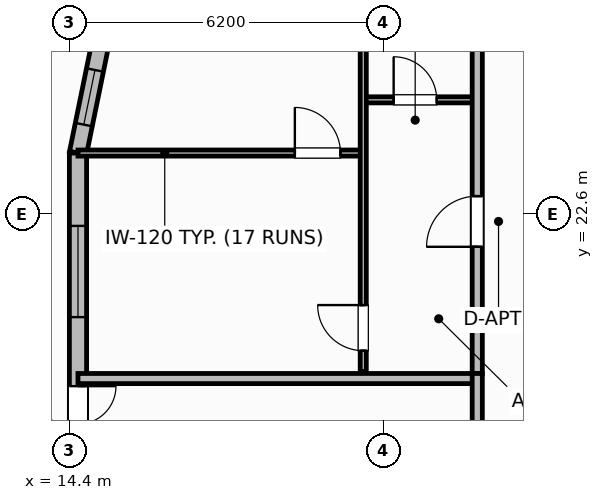
"""IFC4 building model, lengths in metres.
Left out: names, types, materials, properties, quantities, classifications, styles, units other than length and angle.
Written with IfcOpenShell. Run it as: python <this file> out.ifc"""

import sys

from ifc_helpers import new_model, si_unit, direction, frame, frame_2d, origin, place, context, subcontext, project, spatial, rectangle, extrude, element, fill, save


model = new_model("IFC4")
c1 = context("Model", 3, precision=1e-05, world=origin(), true_north=direction((0.0, 1.0)))
c2 = subcontext(c1, "Body", "Model", "MODEL_VIEW")
j1 = project(units=[si_unit("LENGTHUNIT", "METRE"), si_unit("PLANEANGLEUNIT", "RADIAN")], contexts=[c1])
p1 = place(None, origin())
s1 = spatial("IfcSite", under=j1, at=p1, CompositionType="ELEMENT")
p2 = place(p1, origin())
s2 = spatial("IfcBuilding", under=s1, at=p2, CompositionType="ELEMENT")
p3 = place(p2, frame((0.0, 0.0, 24.6)))
s3 = spatial("IfcBuildingStorey", under=s2, at=p3, CompositionType="ELEMENT", Elevation=24.6)
p4 = place(p3, frame((15.02, 26.0, 0.0), z_axis=(0.0, 0.0, 1.0), x_axis=(-0.200379633636, -0.979718328104, 0.0)))
e1 = element("IfcWall", 1, at=p4, inside=s3, PredefinedType="SOLIDWALL", context=c2, shape_type="SweptSolid", body=[
    extrude(rectangle(XDim=2.246, YDim=0.34, at=frame_2d((1.123, 0.0))), origin(), (0.0, 0.0, 1.0), 3.2),
])
p5 = place(p4, frame((0.573, 0.0, 0.95)))
e2 = element("IfcOpeningElement", 2, at=p5, cuts=e1, PredefinedType="OPENING", context=c2, shape_type="SweptSolid", body=[
    extrude(rectangle(XDim=1.1, YDim=1.65, at=frame_2d((0.55, 0.825))), frame((0.0, 0.18, 0.0), z_axis=(0.0, -1.0, 0.0), x_axis=(1.0, 0.0, 0.0)), (0.0, 0.0, 1.0), 0.36),
])
p6 = place(p3, frame((14.57, 23.8, 0.0), z_axis=(0.0, 0.0, 1.0), x_axis=(0.0, -1.0, 0.0)))
e3 = element("IfcWall", 3, at=p6, inside=s3, PredefinedType="SOLIDWALL", context=c2, shape_type="SweptSolid", body=[
    extrude(rectangle(XDim=14.8, YDim=0.34, at=frame_2d((7.4, 0.0))), origin(), (0.0, 0.0, 1.0), 3.2),
])
p7 = place(p6, frame((1.438, 0.0, 0.85)))
e4 = element("IfcOpeningElement", 4, at=p7, cuts=e3, PredefinedType="OPENING", context=c2, shape_type="SweptSolid", body=[
    extrude(rectangle(XDim=1.8, YDim=1.85, at=frame_2d((0.9, 0.925))), frame((0.0, 0.18, 0.0), z_axis=(0.0, -1.0, 0.0), x_axis=(1.0, 0.0, 0.0)), (0.0, 0.0, 1.0), 0.36),
])
p8 = place(p6, frame((4.6, 0.0, 0.0)))
e5 = element("IfcOpeningElement", 5, at=p8, cuts=e3, PredefinedType="OPENING", context=c2, shape_type="SweptSolid", body=[
    extrude(rectangle(XDim=1.5, YDim=2.1, at=frame_2d((0.75, 1.05))), frame((0.0, 0.18, 0.0), z_axis=(0.0, -1.0, 0.0), x_axis=(1.0, 0.0, 0.0)), (0.0, 0.0, 1.0), 0.36),
])
p9 = place(p6, frame((8.538, 0.0, 0.85)))
e6 = element("IfcOpeningElement", 6, at=p9, cuts=e3, PredefinedType="OPENING", context=c2, shape_type="SweptSolid", body=[
    extrude(rectangle(XDim=1.8, YDim=1.85, at=frame_2d((0.9, 0.925))), frame((0.0, 0.18, 0.0), z_axis=(0.0, -1.0, 0.0), x_axis=(1.0, 0.0, 0.0)), (0.0, 0.0, 1.0), 0.36),
])
p10 = place(p3, frame((14.57, 19.35, 0.0), z_axis=(0.0, 0.0, 1.0), x_axis=(1.0, 0.0, 0.0)))
e7 = element("IfcWall", 7, at=p10, inside=s3, PredefinedType="PARTITIONING", context=c2, shape_type="SweptSolid", body=[
    extrude(rectangle(XDim=7.88, YDim=0.2, at=frame_2d((3.94, 0.0))), origin(), (0.0, 0.0, 1.0), 3.03),
])
p11 = place(p3, frame((20.2, 24.85, 0.0), z_axis=(0.0, 0.0, 1.0), x_axis=(1.0, 0.0, 0.0)))
e8 = element("IfcWall", 8, at=p11, inside=s3, PredefinedType="PARTITIONING", context=c2, shape_type="SweptSolid", body=[
    extrude(rectangle(XDim=2.25, YDim=0.12, at=frame_2d((1.125, 0.0))), origin(), (0.0, 0.0, 1.0), 3.03),
])
p12 = place(p11, frame((0.6, 0.0, 0.0)))
e9 = element("IfcOpeningElement", 9, at=p12, cuts=e8, PredefinedType="OPENING", context=c2, shape_type="SweptSolid", body=[
    extrude(rectangle(XDim=0.85, YDim=2.1, at=frame_2d((0.425, 1.05))), frame((0.0, 0.07, 0.0), z_axis=(0.0, -1.0, 0.0), x_axis=(1.0, 0.0, 0.0)), (0.0, 0.0, 1.0), 0.14),
])
p13 = place(p3, frame((14.57, 23.8, 0.0), z_axis=(0.0, 0.0, 1.0), x_axis=(1.0, 0.0, 0.0)))
e10 = element("IfcWall", 10, at=p13, inside=s3, PredefinedType="PARTITIONING", context=c2, shape_type="SweptSolid", body=[
    extrude(rectangle(XDim=5.63, YDim=0.12, at=frame_2d((2.815, 0.0))), origin(), (0.0, 0.0, 1.0), 3.03),
])
p14 = place(p13, frame((4.28, 0.0, 0.0)))
e11 = element("IfcOpeningElement", 11, at=p14, cuts=e10, PredefinedType="OPENING", context=c2, shape_type="SweptSolid", body=[
    extrude(rectangle(XDim=0.9, YDim=2.1, at=frame_2d((0.45, 1.05))), frame((0.0, 0.07, 0.0), z_axis=(0.0, -1.0, 0.0), x_axis=(1.0, 0.0, 0.0)), (0.0, 0.0, 1.0), 0.14),
])
p15 = place(p3, frame((20.2, 19.49, 0.0), z_axis=(0.0, 0.0, 1.0), x_axis=(0.0, 1.0, 0.0)))
e12 = element("IfcWall", 12, at=p15, inside=s3, PredefinedType="PARTITIONING", context=c2, shape_type="SweptSolid", body=[
    extrude(rectangle(XDim=13.095, YDim=0.12, at=frame_2d((6.547, 0.0))), origin(), (0.0, 0.0, 1.0), 3.03),
])
p16 = place(p15, frame((0.41, 0.0, 0.0)))
e13 = element("IfcOpeningElement", 13, at=p16, cuts=e12, PredefinedType="OPENING", context=c2, shape_type="SweptSolid", body=[
    extrude(rectangle(XDim=0.9, YDim=2.1, at=frame_2d((0.45, 1.05))), frame((0.0, 0.07, 0.0), z_axis=(0.0, -1.0, 0.0), x_axis=(1.0, 0.0, 0.0)), (0.0, 0.0, 1.0), 0.14),
])
p17 = place(p15, frame((11.36, 0.0, 0.0)))
e14 = element("IfcOpeningElement", 14, at=p17, cuts=e12, PredefinedType="OPENING", context=c2, shape_type="SweptSolid", body=[
    extrude(rectangle(XDim=0.82, YDim=2.08, at=frame_2d((0.41, 1.04))), frame((0.0, 0.07, 0.0), z_axis=(0.0, -1.0, 0.0), x_axis=(1.0, 0.0, 0.0)), (0.0, 0.0, 1.0), 0.14),
])
p18 = place(p3, frame((22.45, 19.45, 0.0), z_axis=(0.0, 0.0, 1.0), x_axis=(0.0, 1.0, 0.0)))
e15 = element("IfcWall", 15, at=p18, inside=s3, PredefinedType="PARTITIONING", context=c2, shape_type="SweptSolid", body=[
    extrude(rectangle(XDim=26.35, YDim=0.2, at=frame_2d((13.175, 0.0))), origin(), (0.0, 0.0, 1.0), 3.03),
])
p19 = place(p18, frame((2.5, 0.0, 0.0)))
e16 = element("IfcOpeningElement", 16, at=p19, cuts=e15, PredefinedType="OPENING", context=c2, shape_type="SweptSolid", body=[
    extrude(rectangle(XDim=1.0, YDim=2.15, at=frame_2d((0.5, 1.075))), frame((0.0, 0.11, 0.0), z_axis=(0.0, -1.0, 0.0), x_axis=(1.0, 0.0, 0.0)), (0.0, 0.0, 1.0), 0.22),
])
p20 = place(p18, frame((13.875, 0.0, 0.0)))
e17 = element("IfcOpeningElement", 17, at=p20, cuts=e15, PredefinedType="OPENING", context=c2, shape_type="SweptSolid", body=[
    extrude(rectangle(XDim=1.0, YDim=2.15, at=frame_2d((0.5, 1.075))), frame((0.0, 0.11, 0.0), z_axis=(0.0, -1.0, 0.0), x_axis=(1.0, 0.0, 0.0)), (0.0, 0.0, 1.0), 0.22),
])
p21 = place(p3, frame((22.45, 4.97, 0.0), z_axis=(0.0, 0.0, 1.0), x_axis=(0.0, 1.0, 0.0)))
e18 = element("IfcWall", 18, at=p21, inside=s3, PredefinedType="PARTITIONING", context=c2, shape_type="SweptSolid", body=[
    extrude(rectangle(XDim=14.48, YDim=0.2, at=frame_2d((7.24, 0.0))), origin(), (0.0, 0.0, 1.0), 3.03),
])
p22 = place(p5, origin())
e19 = element("IfcWindow", 19, at=p22, inside=s3, PartitioningType="SINGLE_PANEL", PredefinedType="WINDOW", context=c2, shape_type="SweptSolid", body=[
    extrude(rectangle(XDim=1.1, YDim=1.65, at=frame_2d((0.55, 0.825))), frame((0.0, 0.03, 0.0), z_axis=(0.0, -1.0, 0.0), x_axis=(1.0, 0.0, 0.0)), (0.0, 0.0, 1.0), 0.06),
])
fill(e2, e19)
p23 = place(p7, origin())
e20 = element("IfcWindow", 20, at=p23, inside=s3, PartitioningType="SINGLE_PANEL", PredefinedType="WINDOW", context=c2, shape_type="SweptSolid", body=[
    extrude(rectangle(XDim=1.8, YDim=1.85, at=frame_2d((0.9, 0.925))), frame((0.0, 0.03, 0.0), z_axis=(0.0, -1.0, 0.0), x_axis=(1.0, 0.0, 0.0)), (0.0, 0.0, 1.0), 0.06),
])
fill(e4, e20)
p24 = place(p8, origin())
e21 = element("IfcDoor", 21, at=p24, inside=s3, OperationType="DOUBLE_DOOR_SINGLE_SWING", PredefinedType="DOOR", context=c2, shape_type="SweptSolid", body=[
    extrude(rectangle(XDim=1.5, YDim=2.1, at=frame_2d((0.75, 1.05))), frame((0.0, 0.025, 0.0), z_axis=(0.0, -1.0, 0.0), x_axis=(1.0, 0.0, 0.0)), (0.0, 0.0, 1.0), 0.05),
])
fill(e5, e21)
p25 = place(p12, origin())
e22 = element("IfcDoor", 22, at=p25, inside=s3, OperationType="SINGLE_SWING_LEFT", PredefinedType="DOOR", context=c2, shape_type="SweptSolid", body=[
    extrude(rectangle(XDim=0.85, YDim=2.1, at=frame_2d((0.425, 1.05))), frame((0.0, 0.025, 0.0), z_axis=(0.0, -1.0, 0.0), x_axis=(1.0, 0.0, 0.0)), (0.0, 0.0, 1.0), 0.05),
])
fill(e9, e22)
p26 = place(p14, origin())
e23 = element("IfcDoor", 23, at=p26, inside=s3, OperationType="SINGLE_SWING_LEFT", PredefinedType="DOOR", context=c2, shape_type="SweptSolid", body=[
    extrude(rectangle(XDim=0.9, YDim=2.1, at=frame_2d((0.45, 1.05))), frame((0.0, 0.025, 0.0), z_axis=(0.0, -1.0, 0.0), x_axis=(1.0, 0.0, 0.0)), (0.0, 0.0, 1.0), 0.05),
])
fill(e11, e23)
p27 = place(p16, origin())
e24 = element("IfcDoor", 24, at=p27, inside=s3, OperationType="SINGLE_SWING_RIGHT", PredefinedType="DOOR", context=c2, shape_type="SweptSolid", body=[
    extrude(rectangle(XDim=0.9, YDim=2.1, at=frame_2d((0.45, 1.05))), frame((0.0, 0.025, 0.0), z_axis=(0.0, -1.0, 0.0), x_axis=(1.0, 0.0, 0.0)), (0.0, 0.0, 1.0), 0.05),
])
fill(e13, e24)
p28 = place(p19, origin())
e25 = element("IfcDoor", 25, at=p28, inside=s3, OperationType="SINGLE_SWING_LEFT", PredefinedType="DOOR", context=c2, shape_type="SweptSolid", body=[
    extrude(rectangle(XDim=1.0, YDim=2.15, at=frame_2d((0.5, 1.075))), frame((0.0, 0.025, 0.0), z_axis=(0.0, -1.0, 0.0), x_axis=(1.0, 0.0, 0.0)), (0.0, 0.0, 1.0), 0.05),
])
fill(e16, e25)
save(model, sys.argv[1])
